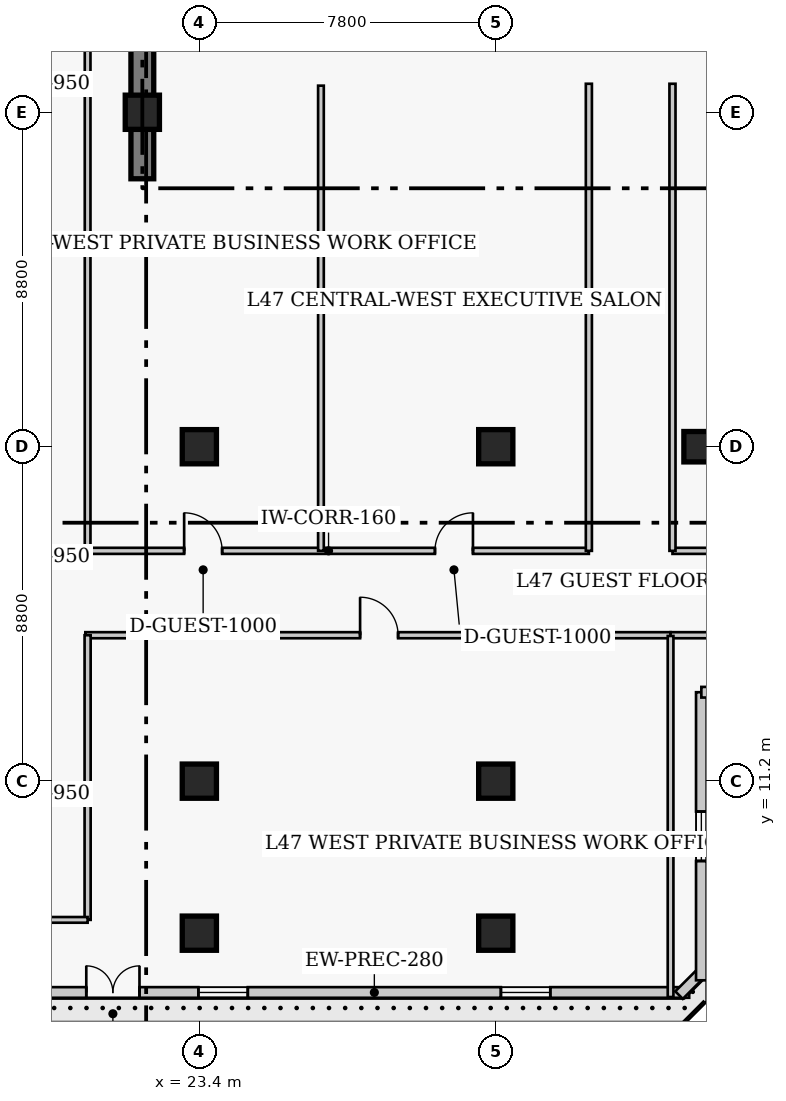
"""IFC4 building model, lengths in metres.
Left out: names, types, materials, properties, quantities, classifications, styles, units other than length and angle.
Written with IfcOpenShell. Run it as: python <this file> out.ifc"""

import sys

from ifc_helpers import new_model, si_unit, direction, frame, frame_2d, origin, origin_2d, place, context, subcontext, project, spatial, rectangle, extrude, element, fill, save


model = new_model("IFC4")
c1 = context("Model", 3, precision=1e-05, world=origin(), true_north=direction((0.0, 1.0)))
c2 = subcontext(c1, "Body", "Model", "MODEL_VIEW")
j1 = project(units=[si_unit("LENGTHUNIT", "METRE"), si_unit("PLANEANGLEUNIT", "RADIAN")], contexts=[c1])
p1 = place(None, origin())
s1 = spatial("IfcSite", under=j1, at=p1, CompositionType="ELEMENT")
p2 = place(p1, origin())
s2 = spatial("IfcBuilding", under=s1, at=p2, CompositionType="ELEMENT")
p3 = place(p2, frame((0.0, 0.0, 189.0)))
s3 = spatial("IfcBuildingStorey", under=s2, at=p3, CompositionType="ELEMENT", Elevation=189.0)
p4 = place(p3, frame((21.9, 27.05, 0.0), z_axis=(0.0, 0.0, 1.0), x_axis=(0.0, 1.0, 0.0)))
e1 = element("IfcWall", 1, at=p4, inside=s3, PredefinedType="SHEAR", context=c2, shape_type="SweptSolid", body=[
    extrude(rectangle(XDim=13.57, YDim=0.6, at=frame_2d((6.785, 0.0))), origin(), (0.0, 0.0, 1.0), 3.9),
])
for number, where, z_axis, x_axis in (
    (2, (23.4, 11.2, 0.0), (0.0, 0.0, 1.0), (1.0, 0.0, 0.0)),
    (3, (23.4, 20.0, 0.0), (0.0, 0.0, 1.0), (1.0, 0.0, 0.0)),
    (4, (31.2, 11.2, 0.0), (0.0, 0.0, 1.0), (1.0, 0.0, 0.0)),
    (5, (31.2, 20.0, 0.0), (0.0, 0.0, 1.0), (1.0, 0.0, 0.0)),
):
    element("IfcColumn", number, at=place(p3, frame(where, z_axis=z_axis, x_axis=x_axis)), inside=s3, PredefinedType="COLUMN", context=c2, shape_type="SweptSolid", body=[
        extrude(rectangle(XDim=0.9, YDim=0.9, at=origin_2d()), origin(), (0.0, 0.0, 1.0), 3.9),
    ])
p5 = place(p3, frame((36.75, 20.0, 0.0), z_axis=(0.0, 0.0, 1.0), x_axis=(1.0, 0.0, 0.0)))
e6 = element("IfcColumn", 6, at=p5, inside=s3, PredefinedType="COLUMN", context=c2, shape_type="SweptSolid", body=[
    extrude(rectangle(XDim=1.2, YDim=0.8, at=origin_2d()), origin(), (0.0, 0.0, 1.0), 3.9),
])
for number, where, z_axis, x_axis in (
    (7, (21.9, 28.8, 0.0), (0.0, 0.0, 1.0), (1.0, 0.0, 0.0)),
    (8, (23.4, 7.2, 0.0), (0.0, 0.0, 1.0), (1.0, 0.0, 0.0)),
    (9, (31.2, 7.2, 0.0), (0.0, 0.0, 1.0), (1.0, 0.0, 0.0)),
):
    element("IfcColumn", number, at=place(p3, frame(where, z_axis=z_axis, x_axis=x_axis)), inside=s3, PredefinedType="COLUMN", context=c2, shape_type="SweptSolid", body=[
        extrude(rectangle(XDim=0.9, YDim=0.9, at=origin_2d()), origin(), (0.0, 0.0, 1.0), 3.9),
    ])
p6 = place(p3, frame((10.46, 5.64, 0.0), z_axis=(0.0, 0.0, 1.0), x_axis=(1.0, 0.0, 0.0)))
e10 = element("IfcWall", 10, at=p6, inside=s3, PredefinedType="SOLIDWALL", context=c2, shape_type="SweptSolid", body=[
    extrude(rectangle(XDim=25.83, YDim=0.28, at=frame_2d((12.915, 0.0))), origin(), (0.0, 0.0, 1.0), 3.65),
])
p7 = place(p6, frame((9.965, 0.0, 0.0)))
e11 = element("IfcOpeningElement", 11, at=p7, cuts=e10, PredefinedType="OPENING", context=c2, shape_type="SweptSolid", body=[
    extrude(rectangle(XDim=1.4, YDim=2.15, at=frame_2d((0.7, 1.075))), frame((0.0, 0.15, 0.0), z_axis=(0.0, -1.0, 0.0), x_axis=(1.0, 0.0, 0.0)), (0.0, 0.0, 1.0), 0.3),
])
p8 = place(p6, frame((4.305, 0.0, 0.85)))
e12 = element("IfcOpeningElement", 12, at=p8, cuts=e10, PredefinedType="OPENING", context=c2, shape_type="SweptSolid", body=[
    extrude(rectangle(XDim=1.3, YDim=1.7, at=frame_2d((0.65, 0.85))), frame((0.0, 0.15, 0.0), z_axis=(0.0, -1.0, 0.0), x_axis=(1.0, 0.0, 0.0)), (0.0, 0.0, 1.0), 0.3),
])
p9 = place(p6, frame((12.915, 0.0, 0.85)))
e13 = element("IfcOpeningElement", 13, at=p9, cuts=e10, PredefinedType="OPENING", context=c2, shape_type="SweptSolid", body=[
    extrude(rectangle(XDim=1.3, YDim=1.7, at=frame_2d((0.65, 0.85))), frame((0.0, 0.15, 0.0), z_axis=(0.0, -1.0, 0.0), x_axis=(1.0, 0.0, 0.0)), (0.0, 0.0, 1.0), 0.3),
])
p10 = place(p6, frame((20.875, 0.0, 0.85)))
e14 = element("IfcOpeningElement", 14, at=p10, cuts=e10, PredefinedType="OPENING", context=c2, shape_type="SweptSolid", body=[
    extrude(rectangle(XDim=1.3, YDim=1.7, at=frame_2d((0.65, 0.85))), frame((0.0, 0.15, 0.0), z_axis=(0.0, -1.0, 0.0), x_axis=(1.0, 0.0, 0.0)), (0.0, 0.0, 1.0), 0.3),
])
p11 = place(p3, frame((36.023, 5.571, 0.0), z_axis=(0.0, 0.0, 1.0), x_axis=(0.707106781187, 0.707106781187, 0.0)))
e15 = element("IfcWall", 15, at=p11, inside=s3, PredefinedType="SOLIDWALL", context=c2, shape_type="SweptSolid", body=[
    extrude(rectangle(XDim=0.928, YDim=0.28, at=frame_2d((0.464, 0.0))), origin(), (0.0, 0.0, 1.0), 3.65),
])
p12 = place(p3, frame((36.61, 5.96, 0.0), z_axis=(0.0, 0.0, 1.0), x_axis=(0.0, 1.0, 0.0)))
e16 = element("IfcWall", 16, at=p12, inside=s3, PredefinedType="SOLIDWALL", context=c2, shape_type="SweptSolid", body=[
    extrude(rectangle(XDim=7.58, YDim=0.28, at=frame_2d((3.79, 0.0))), origin(), (0.0, 0.0, 1.0), 3.65),
])
p13 = place(p12, frame((3.14, 0.0, 0.85)))
e17 = element("IfcOpeningElement", 17, at=p13, cuts=e16, PredefinedType="OPENING", context=c2, shape_type="SweptSolid", body=[
    extrude(rectangle(XDim=1.3, YDim=1.7, at=frame_2d((0.65, 0.85))), frame((0.0, 0.15, 0.0), z_axis=(0.0, -1.0, 0.0), x_axis=(1.0, 0.0, 0.0)), (0.0, 0.0, 1.0), 0.3),
])
p14 = place(p3, frame((36.61, 13.54, 0.0), z_axis=(0.0, 0.0, 1.0), x_axis=(1.0, 0.0, 0.0)))
e18 = element("IfcWall", 18, at=p14, inside=s3, PredefinedType="SOLIDWALL", context=c2, shape_type="SweptSolid", body=[
    extrude(rectangle(XDim=4.78, YDim=0.28, at=frame_2d((2.39, 0.0))), origin(), (0.0, 0.0, 1.0), 3.65),
])
p15 = place(p14, frame((1.74, 0.0, 0.85)))
e19 = element("IfcOpeningElement", 19, at=p15, cuts=e18, PredefinedType="OPENING", context=c2, shape_type="SweptSolid", body=[
    extrude(rectangle(XDim=1.3, YDim=1.7, at=frame_2d((0.65, 0.85))), frame((0.0, 0.15, 0.0), z_axis=(0.0, -1.0, 0.0), x_axis=(1.0, 0.0, 0.0)), (0.0, 0.0, 1.0), 0.3),
])
p16 = place(p3, frame((20.4, 17.26, 0.0), z_axis=(0.0, 0.0, 1.0), x_axis=(1.0, 0.0, 0.0)))
e20 = element("IfcWall", 20, at=p16, inside=s3, PredefinedType="PARTITIONING", context=c2, shape_type="SweptSolid", body=[
    extrude(rectangle(XDim=13.25, YDim=0.16, at=frame_2d((6.625, 0.0))), origin(), (0.0, 0.0, 1.0), 3.65),
])
p17 = place(p16, frame((2.6, 0.0, 0.0)))
e21 = element("IfcOpeningElement", 21, at=p17, cuts=e20, PredefinedType="OPENING", context=c2, shape_type="SweptSolid", body=[
    extrude(rectangle(XDim=1.0, YDim=2.15, at=frame_2d((0.5, 1.075))), frame((0.0, 0.09, 0.0), z_axis=(0.0, -1.0, 0.0), x_axis=(1.0, 0.0, 0.0)), (0.0, 0.0, 1.0), 0.18),
])
p18 = place(p16, frame((9.2, 0.0, 0.0)))
e22 = element("IfcOpeningElement", 22, at=p18, cuts=e20, PredefinedType="OPENING", context=c2, shape_type="SweptSolid", body=[
    extrude(rectangle(XDim=1.0, YDim=2.15, at=frame_2d((0.5, 1.075))), frame((0.0, 0.09, 0.0), z_axis=(0.0, -1.0, 0.0), x_axis=(1.0, 0.0, 0.0)), (0.0, 0.0, 1.0), 0.18),
])
p19 = place(p3, frame((35.85, 17.26, 0.0), z_axis=(0.0, 0.0, 1.0), x_axis=(1.0, 0.0, 0.0)))
e23 = element("IfcWall", 23, at=p19, inside=s3, PredefinedType="PARTITIONING", context=c2, shape_type="SweptSolid", body=[
    extrude(rectangle(XDim=23.35, YDim=0.16, at=frame_2d((11.675, 0.0))), origin(), (0.0, 0.0, 1.0), 3.65),
])
p20 = place(p19, frame((8.95, 0.0, 0.0)))
e24 = element("IfcOpeningElement", 24, at=p20, cuts=e23, PredefinedType="OPENING", context=c2, shape_type="SweptSolid", body=[
    extrude(rectangle(XDim=1.0, YDim=2.15, at=frame_2d((0.5, 1.075))), frame((0.0, 0.09, 0.0), z_axis=(0.0, -1.0, 0.0), x_axis=(1.0, 0.0, 0.0)), (0.0, 0.0, 1.0), 0.18),
])
p21 = place(p19, frame((17.625, 0.0, 0.0)))
e25 = element("IfcOpeningElement", 25, at=p21, cuts=e23, PredefinedType="OPENING", context=c2, shape_type="SweptSolid", body=[
    extrude(rectangle(XDim=1.0, YDim=2.15, at=frame_2d((0.5, 1.075))), frame((0.0, 0.09, 0.0), z_axis=(0.0, -1.0, 0.0), x_axis=(1.0, 0.0, 0.0)), (0.0, 0.0, 1.0), 0.18),
])
for number, where, z_axis, x_axis in (
    (26, (33.65, 17.26, 0.0), (0.0, 0.0, 1.0), (0.0, 1.0, 0.0)),
    (27, (35.85, 17.26, 0.0), (0.0, 0.0, 1.0), (0.0, 1.0, 0.0)),
):
    element("IfcWall", number, at=place(p3, frame(where, z_axis=z_axis, x_axis=x_axis)), inside=s3, PredefinedType="PARTITIONING", context=c2, shape_type="SweptSolid", body=[
        extrude(rectangle(XDim=12.29, YDim=0.16, at=frame_2d((6.145, 0.0))), origin(), (0.0, 0.0, 1.0), 3.65),
    ])
p22 = place(p3, frame((20.4, 15.04, 0.0), z_axis=(0.0, 0.0, 1.0), x_axis=(1.0, 0.0, 0.0)))
e28 = element("IfcWall", 28, at=p22, inside=s3, PredefinedType="PARTITIONING", context=c2, shape_type="SweptSolid", body=[
    extrude(rectangle(XDim=15.4, YDim=0.16, at=frame_2d((7.7, 0.0))), origin(), (0.0, 0.0, 1.0), 3.65),
])
p23 = place(p22, frame((7.23, 0.0, 0.0)))
e29 = element("IfcOpeningElement", 29, at=p23, cuts=e28, PredefinedType="OPENING", context=c2, shape_type="SweptSolid", body=[
    extrude(rectangle(XDim=1.0, YDim=2.15, at=frame_2d((0.5, 1.075))), frame((0.0, 0.09, 0.0), z_axis=(0.0, -1.0, 0.0), x_axis=(1.0, 0.0, 0.0)), (0.0, 0.0, 1.0), 0.18),
])
p24 = place(p3, frame((35.8, 15.04, 0.0), z_axis=(0.0, 0.0, 1.0), x_axis=(1.0, 0.0, 0.0)))
e30 = element("IfcWall", 30, at=p24, inside=s3, PredefinedType="PARTITIONING", context=c2, shape_type="SweptSolid", body=[
    extrude(rectangle(XDim=23.4, YDim=0.16, at=frame_2d((11.7, 0.0))), origin(), (0.0, 0.0, 1.0), 3.65),
])
p25 = place(p24, frame((11.25, 0.0, 0.0)))
e31 = element("IfcOpeningElement", 31, at=p25, cuts=e30, PredefinedType="OPENING", context=c2, shape_type="SweptSolid", body=[
    extrude(rectangle(XDim=0.95, YDim=2.1, at=frame_2d((0.475, 1.05))), frame((0.0, 0.09, 0.0), z_axis=(0.0, -1.0, 0.0), x_axis=(1.0, 0.0, 0.0)), (0.0, 0.0, 1.0), 0.18),
])
p26 = place(p24, frame((18.4, 0.0, 0.0)))
e32 = element("IfcOpeningElement", 32, at=p26, cuts=e30, PredefinedType="OPENING", context=c2, shape_type="SweptSolid", body=[
    extrude(rectangle(XDim=1.0, YDim=2.15, at=frame_2d((0.5, 1.075))), frame((0.0, 0.09, 0.0), z_axis=(0.0, -1.0, 0.0), x_axis=(1.0, 0.0, 0.0)), (0.0, 0.0, 1.0), 0.18),
])
p27 = place(p3, frame((20.46, 7.55, 0.0), z_axis=(0.0, 0.0, 1.0), x_axis=(0.0, 1.0, 0.0)))
e33 = element("IfcWall", 33, at=p27, inside=s3, PredefinedType="PARTITIONING", context=c2, shape_type="SweptSolid", body=[
    extrude(rectangle(XDim=7.49, YDim=0.16, at=frame_2d((3.745, 0.0))), origin(), (0.0, 0.0, 1.0), 3.65),
])
p28 = place(p3, frame((18.24, 7.55, 0.0), z_axis=(0.0, 0.0, 1.0), x_axis=(1.0, 0.0, 0.0)))
e34 = element("IfcWall", 34, at=p28, inside=s3, PredefinedType="PARTITIONING", context=c2, shape_type="SweptSolid", body=[
    extrude(rectangle(XDim=2.22, YDim=0.15, at=frame_2d((1.11, 0.0))), origin(), (0.0, 0.0, 1.0), 3.65),
])
p29 = place(p3, frame((20.46, 17.26, 0.0), z_axis=(0.0, 0.0, 1.0), x_axis=(0.0, 1.0, 0.0)))
e35 = element("IfcWall", 35, at=p29, inside=s3, PredefinedType="PARTITIONING", context=c2, shape_type="SweptSolid", body=[
    extrude(rectangle(XDim=15.54, YDim=0.15, at=frame_2d((7.77, 0.0))), origin(), (0.0, 0.0, 1.0), 3.65),
])
p30 = place(p3, frame((26.6, 17.26, 0.0), z_axis=(0.0, 0.0, 1.0), x_axis=(0.0, 1.0, 0.0)))
e36 = element("IfcWall", 36, at=p30, inside=s3, PredefinedType="PARTITIONING", context=c2, shape_type="SweptSolid", body=[
    extrude(rectangle(XDim=12.24, YDim=0.15, at=frame_2d((6.12, 0.0))), origin(), (0.0, 0.0, 1.0), 3.65),
])
p31 = place(p3, frame((35.8, 5.52, 0.0), z_axis=(0.0, 0.0, 1.0), x_axis=(0.0, 1.0, 0.0)))
e37 = element("IfcWall", 37, at=p31, inside=s3, PredefinedType="PARTITIONING", context=c2, shape_type="SweptSolid", body=[
    extrude(rectangle(XDim=9.5, YDim=0.15, at=frame_2d((4.75, 0.0))), origin(), (0.0, 0.0, 1.0), 3.65),
])
p32 = place(p7, origin())
e38 = element("IfcDoor", 38, at=p32, inside=s3, OperationType="DOUBLE_DOOR_SINGLE_SWING", PredefinedType="DOOR", context=c2, shape_type="SweptSolid", body=[
    extrude(rectangle(XDim=1.4, YDim=2.15, at=frame_2d((0.7, 1.075))), frame((0.0, 0.025, 0.0), z_axis=(0.0, -1.0, 0.0), x_axis=(1.0, 0.0, 0.0)), (0.0, 0.0, 1.0), 0.05),
])
fill(e11, e38)
p33 = place(p9, origin())
e39 = element("IfcWindow", 39, at=p33, inside=s3, PartitioningType="SINGLE_PANEL", PredefinedType="WINDOW", context=c2, shape_type="SweptSolid", body=[
    extrude(rectangle(XDim=1.3, YDim=1.7, at=frame_2d((0.65, 0.85))), frame((0.0, 0.03, 0.0), z_axis=(0.0, -1.0, 0.0), x_axis=(1.0, 0.0, 0.0)), (0.0, 0.0, 1.0), 0.06),
])
fill(e13, e39)
p34 = place(p10, origin())
e40 = element("IfcWindow", 40, at=p34, inside=s3, PartitioningType="SINGLE_PANEL", PredefinedType="WINDOW", context=c2, shape_type="SweptSolid", body=[
    extrude(rectangle(XDim=1.3, YDim=1.7, at=frame_2d((0.65, 0.85))), frame((0.0, 0.03, 0.0), z_axis=(0.0, -1.0, 0.0), x_axis=(1.0, 0.0, 0.0)), (0.0, 0.0, 1.0), 0.06),
])
fill(e14, e40)
p35 = place(p13, origin())
e41 = element("IfcWindow", 41, at=p35, inside=s3, PartitioningType="SINGLE_PANEL", PredefinedType="WINDOW", context=c2, shape_type="SweptSolid", body=[
    extrude(rectangle(XDim=1.3, YDim=1.7, at=frame_2d((0.65, 0.85))), frame((0.0, 0.03, 0.0), z_axis=(0.0, -1.0, 0.0), x_axis=(1.0, 0.0, 0.0)), (0.0, 0.0, 1.0), 0.06),
])
fill(e17, e41)
p36 = place(p17, origin())
e42 = element("IfcDoor", 42, at=p36, inside=s3, OperationType="SINGLE_SWING_LEFT", PredefinedType="DOOR", context=c2, shape_type="SweptSolid", body=[
    extrude(rectangle(XDim=1.0, YDim=2.15, at=frame_2d((0.5, 1.075))), frame((0.0, 0.025, 0.0), z_axis=(0.0, -1.0, 0.0), x_axis=(1.0, 0.0, 0.0)), (0.0, 0.0, 1.0), 0.05),
])
fill(e21, e42)
p37 = place(p18, origin())
e43 = element("IfcDoor", 43, at=p37, inside=s3, OperationType="SINGLE_SWING_RIGHT", PredefinedType="DOOR", context=c2, shape_type="SweptSolid", body=[
    extrude(rectangle(XDim=1.0, YDim=2.15, at=frame_2d((0.5, 1.075))), frame((0.0, 0.025, 0.0), z_axis=(0.0, -1.0, 0.0), x_axis=(1.0, 0.0, 0.0)), (0.0, 0.0, 1.0), 0.05),
])
fill(e22, e43)
p38 = place(p23, origin())
e44 = element("IfcDoor", 44, at=p38, inside=s3, OperationType="SINGLE_SWING_LEFT", PredefinedType="DOOR", context=c2, shape_type="SweptSolid", body=[
    extrude(rectangle(XDim=1.0, YDim=2.15, at=frame_2d((0.5, 1.075))), frame((0.0, 0.025, 0.0), z_axis=(0.0, -1.0, 0.0), x_axis=(1.0, 0.0, 0.0)), (0.0, 0.0, 1.0), 0.05),
])
fill(e29, e44)
save(model, sys.argv[1])
